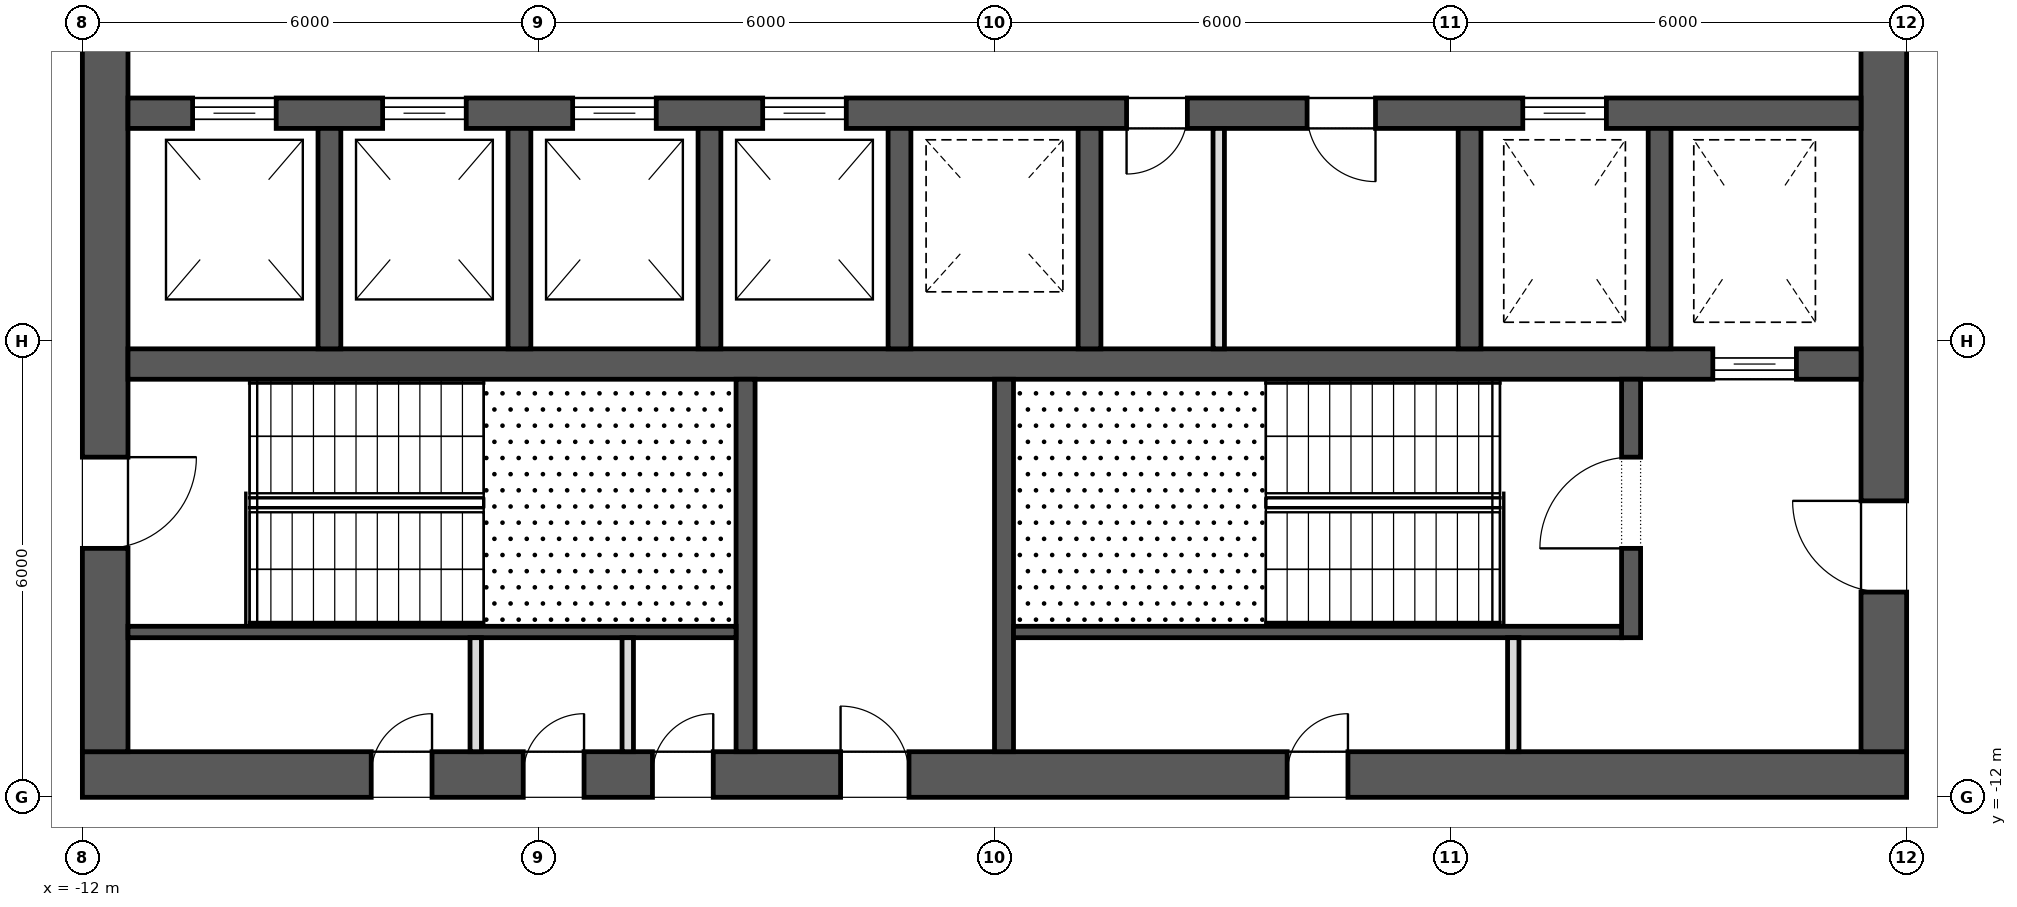
"""IFC4 building model, lengths in metres.
Left out: names, types, materials, properties, quantities, classifications, styles, units other than length and angle.
Written with IfcOpenShell. Run it as: python <this file> out.ifc"""

import sys

from ifc_helpers import new_model, si_unit, direction, frame, frame_2d, origin, place, context, subcontext, project, spatial, rectangle, extrude, element, fill, save


model = new_model("IFC4")
c1 = context("Model", 3, precision=1e-05, world=origin(), true_north=direction((0.0, 1.0)))
c2 = subcontext(c1, "Body", "Model", "MODEL_VIEW")
j1 = project(units=[si_unit("LENGTHUNIT", "METRE"), si_unit("PLANEANGLEUNIT", "RADIAN")], contexts=[c1])
p1 = place(None, origin())
s1 = spatial("IfcSite", under=j1, at=p1, CompositionType="ELEMENT")
p2 = place(p1, origin())
s2 = spatial("IfcBuilding", under=s1, at=p2, CompositionType="ELEMENT")
p3 = place(p2, frame((0.0, 0.0, 186.9)))
s3 = spatial("IfcBuildingStorey", under=s2, at=p3, CompositionType="ELEMENT", Elevation=186.9)
p4 = place(p3, frame((-12.0, -11.7, 0.0), z_axis=(0.0, 0.0, 1.0), x_axis=(1.0, 0.0, 0.0)))
e1 = element("IfcWall", 1, at=p4, inside=s3, PredefinedType="SHEAR", context=c2, shape_type="SweptSolid", body=[
    extrude(rectangle(XDim=24.0, YDim=0.6, at=frame_2d((12.0, 0.0))), origin(), (0.0, 0.0, 1.0), 4.0),
])
p5 = place(p4, frame((9.975, 0.0, 0.0)))
e2 = element("IfcOpeningElement", 2, at=p5, cuts=e1, PredefinedType="OPENING", context=c2, shape_type="SweptSolid", body=[
    extrude(rectangle(XDim=0.9, YDim=2.1, at=frame_2d((0.45, 1.05))), frame((0.0, 0.312, 0.0), z_axis=(0.0, -1.0, 0.0), x_axis=(1.0, 0.0, 0.0)), (0.0, 0.0, 1.0), 0.624),
])
p6 = place(p4, frame((3.8, 0.0, 0.0)))
e3 = element("IfcOpeningElement", 3, at=p6, cuts=e1, PredefinedType="OPENING", context=c2, shape_type="SweptSolid", body=[
    extrude(rectangle(XDim=0.8, YDim=2.1, at=frame_2d((0.4, 1.05))), frame((0.0, 0.312, 0.0), z_axis=(0.0, -1.0, 0.0), x_axis=(1.0, 0.0, 0.0)), (0.0, 0.0, 1.0), 0.624),
])
p7 = place(p4, frame((5.8, 0.0, 0.0)))
e4 = element("IfcOpeningElement", 4, at=p7, cuts=e1, PredefinedType="OPENING", context=c2, shape_type="SweptSolid", body=[
    extrude(rectangle(XDim=0.8, YDim=2.1, at=frame_2d((0.4, 1.05))), frame((0.0, 0.312, 0.0), z_axis=(0.0, -1.0, 0.0), x_axis=(1.0, 0.0, 0.0)), (0.0, 0.0, 1.0), 0.624),
])
p8 = place(p4, frame((7.5, 0.0, 0.0)))
e5 = element("IfcOpeningElement", 5, at=p8, cuts=e1, PredefinedType="OPENING", context=c2, shape_type="SweptSolid", body=[
    extrude(rectangle(XDim=0.8, YDim=2.1, at=frame_2d((0.4, 1.05))), frame((0.0, 0.312, 0.0), z_axis=(0.0, -1.0, 0.0), x_axis=(1.0, 0.0, 0.0)), (0.0, 0.0, 1.0), 0.624),
])
p9 = place(p4, frame((15.85, 0.0, 0.0)))
e6 = element("IfcOpeningElement", 6, at=p9, cuts=e1, PredefinedType="OPENING", context=c2, shape_type="SweptSolid", body=[
    extrude(rectangle(XDim=0.8, YDim=2.1, at=frame_2d((0.4, 1.05))), frame((0.0, 0.312, 0.0), z_axis=(0.0, -1.0, 0.0), x_axis=(1.0, 0.0, 0.0)), (0.0, 0.0, 1.0), 0.624),
])
p10 = place(p3, frame((11.7, -11.4, 0.0), z_axis=(0.0, 0.0, 1.0), x_axis=(0.0, 1.0, 0.0)))
e7 = element("IfcWall", 7, at=p10, inside=s3, PredefinedType="SHEAR", context=c2, shape_type="SweptSolid", body=[
    extrude(rectangle(XDim=22.8, YDim=0.6, at=frame_2d((11.4, 0.0))), origin(), (0.0, 0.0, 1.0), 4.0),
])
p11 = place(p10, frame((10.2, 0.0, 0.0)))
e8 = element("IfcOpeningElement", 8, at=p11, cuts=e7, PredefinedType="OPENING", context=c2, shape_type="SweptSolid", body=[
    extrude(rectangle(XDim=2.4, YDim=2.1, at=frame_2d((1.2, 1.05))), frame((0.0, 0.312, 0.0), z_axis=(0.0, -1.0, 0.0), x_axis=(1.0, 0.0, 0.0)), (0.0, 0.0, 1.0), 0.624),
])
p12 = place(p10, frame((19.5, 0.0, 0.0)))
e9 = element("IfcOpeningElement", 9, at=p12, cuts=e7, PredefinedType="OPENING", context=c2, shape_type="SweptSolid", body=[
    extrude(rectangle(XDim=1.2, YDim=2.1, at=frame_2d((0.6, 1.05))), frame((0.0, 0.312, 0.0), z_axis=(0.0, -1.0, 0.0), x_axis=(1.0, 0.0, 0.0)), (0.0, 0.0, 1.0), 0.624),
])
p13 = place(p10, frame((2.1, 0.0, 0.0)))
e10 = element("IfcOpeningElement", 10, at=p13, cuts=e7, PredefinedType="OPENING", context=c2, shape_type="SweptSolid", body=[
    extrude(rectangle(XDim=1.2, YDim=2.1, at=frame_2d((0.6, 1.05))), frame((0.0, 0.312, 0.0), z_axis=(0.0, -1.0, 0.0), x_axis=(1.0, 0.0, 0.0)), (0.0, 0.0, 1.0), 0.624),
])
p14 = place(p3, frame((-11.7, -11.4, 0.0), z_axis=(0.0, 0.0, 1.0), x_axis=(0.0, 1.0, 0.0)))
e11 = element("IfcWall", 11, at=p14, inside=s3, PredefinedType="SHEAR", context=c2, shape_type="SweptSolid", body=[
    extrude(rectangle(XDim=22.8, YDim=0.6, at=frame_2d((11.4, 0.0))), origin(), (0.0, 0.0, 1.0), 4.0),
])
p15 = place(p14, frame((10.2, 0.0, 0.0)))
e12 = element("IfcOpeningElement", 12, at=p15, cuts=e11, PredefinedType="OPENING", context=c2, shape_type="SweptSolid", body=[
    extrude(rectangle(XDim=2.4, YDim=2.1, at=frame_2d((1.2, 1.05))), frame((0.0, 0.312, 0.0), z_axis=(0.0, -1.0, 0.0), x_axis=(1.0, 0.0, 0.0)), (0.0, 0.0, 1.0), 0.624),
])
p16 = place(p14, frame((18.925, 0.0, 0.0)))
e13 = element("IfcOpeningElement", 13, at=p16, cuts=e11, PredefinedType="OPENING", context=c2, shape_type="SweptSolid", body=[
    extrude(rectangle(XDim=1.2, YDim=2.1, at=frame_2d((0.6, 1.05))), frame((0.0, 0.312, 0.0), z_axis=(0.0, -1.0, 0.0), x_axis=(1.0, 0.0, 0.0)), (0.0, 0.0, 1.0), 0.624),
])
p17 = place(p14, frame((2.675, 0.0, 0.0)))
e14 = element("IfcOpeningElement", 14, at=p17, cuts=e11, PredefinedType="OPENING", context=c2, shape_type="SweptSolid", body=[
    extrude(rectangle(XDim=1.2, YDim=2.1, at=frame_2d((0.6, 1.05))), frame((0.0, 0.312, 0.0), z_axis=(0.0, -1.0, 0.0), x_axis=(1.0, 0.0, 0.0)), (0.0, 0.0, 1.0), 0.624),
])
p18 = place(p3, frame((-11.4, -3.0, 0.0), z_axis=(0.0, 0.0, 1.0), x_axis=(1.0, 0.0, 0.0)))
e15 = element("IfcWall", 15, at=p18, inside=s3, PredefinedType="SHEAR", context=c2, shape_type="SweptSolid", body=[
    extrude(rectangle(XDim=22.8, YDim=0.4, at=frame_2d((11.4, 0.0))), origin(), (0.0, 0.0, 1.0), 4.0),
])
p19 = place(p18, frame((0.85, 0.0, 0.0)))
e16 = element("IfcOpeningElement", 16, at=p19, cuts=e15, PredefinedType="OPENING", context=c2, shape_type="SweptSolid", body=[
    extrude(rectangle(XDim=1.1, YDim=2.1, at=frame_2d((0.55, 1.05))), frame((0.0, 0.212, 0.0), z_axis=(0.0, -1.0, 0.0), x_axis=(1.0, 0.0, 0.0)), (0.0, 0.0, 1.0), 0.424),
])
p20 = place(p18, frame((3.35, 0.0, 0.0)))
e17 = element("IfcOpeningElement", 17, at=p20, cuts=e15, PredefinedType="OPENING", context=c2, shape_type="SweptSolid", body=[
    extrude(rectangle(XDim=1.1, YDim=2.1, at=frame_2d((0.55, 1.05))), frame((0.0, 0.212, 0.0), z_axis=(0.0, -1.0, 0.0), x_axis=(1.0, 0.0, 0.0)), (0.0, 0.0, 1.0), 0.424),
])
p21 = place(p18, frame((5.85, 0.0, 0.0)))
e18 = element("IfcOpeningElement", 18, at=p21, cuts=e15, PredefinedType="OPENING", context=c2, shape_type="SweptSolid", body=[
    extrude(rectangle(XDim=1.1, YDim=2.1, at=frame_2d((0.55, 1.05))), frame((0.0, 0.212, 0.0), z_axis=(0.0, -1.0, 0.0), x_axis=(1.0, 0.0, 0.0)), (0.0, 0.0, 1.0), 0.424),
])
p22 = place(p18, frame((8.35, 0.0, 0.0)))
e19 = element("IfcOpeningElement", 19, at=p22, cuts=e15, PredefinedType="OPENING", context=c2, shape_type="SweptSolid", body=[
    extrude(rectangle(XDim=1.1, YDim=2.1, at=frame_2d((0.55, 1.05))), frame((0.0, 0.212, 0.0), z_axis=(0.0, -1.0, 0.0), x_axis=(1.0, 0.0, 0.0)), (0.0, 0.0, 1.0), 0.424),
])
p23 = place(p18, frame((18.35, 0.0, 0.0)))
e20 = element("IfcOpeningElement", 20, at=p23, cuts=e15, PredefinedType="OPENING", context=c2, shape_type="SweptSolid", body=[
    extrude(rectangle(XDim=1.1, YDim=2.1, at=frame_2d((0.55, 1.05))), frame((0.0, 0.212, 0.0), z_axis=(0.0, -1.0, 0.0), x_axis=(1.0, 0.0, 0.0)), (0.0, 0.0, 1.0), 0.424),
])
p24 = place(p18, frame((13.137, 0.0, 0.0)))
e21 = element("IfcOpeningElement", 21, at=p24, cuts=e15, PredefinedType="OPENING", context=c2, shape_type="SweptSolid", body=[
    extrude(rectangle(XDim=0.8, YDim=2.1, at=frame_2d((0.4, 1.05))), frame((0.0, 0.212, 0.0), z_axis=(0.0, -1.0, 0.0), x_axis=(1.0, 0.0, 0.0)), (0.0, 0.0, 1.0), 0.424),
])
p25 = place(p18, frame((15.512, 0.0, 0.0)))
e22 = element("IfcOpeningElement", 22, at=p25, cuts=e15, PredefinedType="OPENING", context=c2, shape_type="SweptSolid", body=[
    extrude(rectangle(XDim=0.9, YDim=2.1, at=frame_2d((0.45, 1.05))), frame((0.0, 0.212, 0.0), z_axis=(0.0, -1.0, 0.0), x_axis=(1.0, 0.0, 0.0)), (0.0, 0.0, 1.0), 0.424),
])
p26 = place(p3, frame((-11.4, -6.3, 0.0), z_axis=(0.0, 0.0, 1.0), x_axis=(1.0, 0.0, 0.0)))
e23 = element("IfcWall", 23, at=p26, inside=s3, PredefinedType="SHEAR", context=c2, shape_type="SweptSolid", body=[
    extrude(rectangle(XDim=22.8, YDim=0.4, at=frame_2d((11.4, 0.0))), origin(), (0.0, 0.0, 1.0), 4.0),
])
p27 = place(p26, frame((20.85, 0.0, 0.0)))
e24 = element("IfcOpeningElement", 24, at=p27, cuts=e23, PredefinedType="OPENING", context=c2, shape_type="SweptSolid", body=[
    extrude(rectangle(XDim=1.1, YDim=2.1, at=frame_2d((0.55, 1.05))), frame((0.0, 0.212, 0.0), z_axis=(0.0, -1.0, 0.0), x_axis=(1.0, 0.0, 0.0)), (0.0, 0.0, 1.0), 0.424),
])
for number, where, z_axis, x_axis in (
    (25, (-8.75, -6.1, 0.0), (0.0, 0.0, 1.0), (0.0, 1.0, 0.0)),
    (26, (-6.25, -6.1, 0.0), (0.0, 0.0, 1.0), (0.0, 1.0, 0.0)),
    (27, (-3.75, -6.1, 0.0), (0.0, 0.0, 1.0), (0.0, 1.0, 0.0)),
    (28, (-1.25, -6.1, 0.0), (0.0, 0.0, 1.0), (0.0, 1.0, 0.0)),
    (29, (1.25, -6.1, 0.0), (0.0, 0.0, 1.0), (0.0, 1.0, 0.0)),
    (30, (6.25, -6.1, 0.0), (0.0, 0.0, 1.0), (0.0, 1.0, 0.0)),
    (31, (8.75, -6.1, 0.0), (0.0, 0.0, 1.0), (0.0, 1.0, 0.0)),
):
    element("IfcWall", number, at=place(p3, frame(where, z_axis=z_axis, x_axis=x_axis)), inside=s3, PredefinedType="SHEAR", context=c2, shape_type="SweptSolid", body=[
        extrude(rectangle(XDim=2.9, YDim=0.3, at=frame_2d((1.45, 0.0))), origin(), (0.0, 0.0, 1.0), 4.0),
    ])
for number, where, z_axis, x_axis in (
    (32, (-3.275, -11.4, 0.0), (0.0, 0.0, 1.0), (0.0, 1.0, 0.0)),
    (33, (0.125, -11.4, 0.0), (0.0, 0.0, 1.0), (0.0, 1.0, 0.0)),
):
    element("IfcWall", number, at=place(p3, frame(where, z_axis=z_axis, x_axis=x_axis)), inside=s3, PredefinedType="SHEAR", context=c2, shape_type="SweptSolid", body=[
        extrude(rectangle(XDim=4.9, YDim=0.25, at=frame_2d((2.45, 0.0))), origin(), (0.0, 0.0, 1.0), 3.7),
    ])
p28 = place(p3, frame((8.375, -9.9, 0.0), z_axis=(0.0, 0.0, 1.0), x_axis=(0.0, 1.0, 0.0)))
e34 = element("IfcWall", 34, at=p28, inside=s3, PredefinedType="SHEAR", context=c2, shape_type="SweptSolid", body=[
    extrude(rectangle(XDim=3.4, YDim=0.25, at=frame_2d((1.7, 0.0))), origin(), (0.0, 0.0, 1.0), 3.7),
])
p29 = place(p28, frame((1.175, 0.0, 0.0)))
e35 = element("IfcOpeningElement", 35, at=p29, cuts=e34, PredefinedType="OPENING", context=c2, shape_type="SweptSolid", body=[
    extrude(rectangle(XDim=1.2, YDim=2.1, at=frame_2d((0.6, 1.05))), frame((0.0, 0.137, 0.0), z_axis=(0.0, -1.0, 0.0), x_axis=(1.0, 0.0, 0.0)), (0.0, 0.0, 1.0), 0.274),
])
for number, where, z_axis, x_axis in (
    (36, (-11.4, -9.825, 0.0), (0.0, 0.0, 1.0), (1.0, 0.0, 0.0)),
    (37, (0.25, -9.825, 0.0), (0.0, 0.0, 1.0), (1.0, 0.0, 0.0)),
):
    element("IfcWall", number, at=place(p3, frame(where, z_axis=z_axis, x_axis=x_axis)), inside=s3, PredefinedType="SHEAR", context=c2, shape_type="SweptSolid", body=[
        extrude(rectangle(XDim=8.0, YDim=0.15, at=frame_2d((4.0, 0.0))), origin(), (0.0, 0.0, 1.0), 3.7),
    ])
for number, where, z_axis, x_axis in (
    (38, (-6.825, -11.4, 0.0), (0.0, 0.0, 1.0), (0.0, 1.0, 0.0)),
    (39, (-4.825, -11.4, 0.0), (0.0, 0.0, 1.0), (0.0, 1.0, 0.0)),
    (40, (6.825, -11.4, 0.0), (0.0, 0.0, 1.0), (0.0, 1.0, 0.0)),
):
    element("IfcWall", number, at=place(p3, frame(where, z_axis=z_axis, x_axis=x_axis)), inside=s3, PredefinedType="PARTITIONING", context=c2, shape_type="SweptSolid", body=[
        extrude(rectangle(XDim=1.5, YDim=0.15, at=frame_2d((0.75, 0.0))), origin(), (0.0, 0.0, 1.0), 3.7),
    ])
p30 = place(p3, frame((2.95, -6.1, 0.0), z_axis=(0.0, 0.0, 1.0), x_axis=(0.0, 1.0, 0.0)))
e41 = element("IfcWall", 41, at=p30, inside=s3, PredefinedType="PARTITIONING", context=c2, shape_type="SweptSolid", body=[
    extrude(rectangle(XDim=2.9, YDim=0.15, at=frame_2d((1.45, 0.0))), origin(), (0.0, 0.0, 1.0), 3.7),
])
p31 = place(p27, origin())
e42 = element("IfcDoor", 42, at=p31, inside=s3, OperationType="SLIDING_TO_LEFT", PredefinedType="DOOR", context=c2, shape_type="SweptSolid", body=[
    extrude(rectangle(XDim=1.1, YDim=2.1, at=frame_2d((0.55, 1.05))), frame((0.0, 0.025, 0.0), z_axis=(0.0, -1.0, 0.0), x_axis=(1.0, 0.0, 0.0)), (0.0, 0.0, 1.0), 0.05),
])
fill(e24, e42)
p32 = place(p19, origin())
e43 = element("IfcDoor", 43, at=p32, inside=s3, OperationType="SLIDING_TO_LEFT", PredefinedType="DOOR", context=c2, shape_type="SweptSolid", body=[
    extrude(rectangle(XDim=1.1, YDim=2.1, at=frame_2d((0.55, 1.05))), frame((0.0, 0.025, 0.0), z_axis=(0.0, -1.0, 0.0), x_axis=(1.0, 0.0, 0.0)), (0.0, 0.0, 1.0), 0.05),
])
fill(e16, e43)
p33 = place(p20, origin())
e44 = element("IfcDoor", 44, at=p33, inside=s3, OperationType="SLIDING_TO_LEFT", PredefinedType="DOOR", context=c2, shape_type="SweptSolid", body=[
    extrude(rectangle(XDim=1.1, YDim=2.1, at=frame_2d((0.55, 1.05))), frame((0.0, 0.025, 0.0), z_axis=(0.0, -1.0, 0.0), x_axis=(1.0, 0.0, 0.0)), (0.0, 0.0, 1.0), 0.05),
])
fill(e17, e44)
p34 = place(p21, origin())
e45 = element("IfcDoor", 45, at=p34, inside=s3, OperationType="SLIDING_TO_LEFT", PredefinedType="DOOR", context=c2, shape_type="SweptSolid", body=[
    extrude(rectangle(XDim=1.1, YDim=2.1, at=frame_2d((0.55, 1.05))), frame((0.0, 0.025, 0.0), z_axis=(0.0, -1.0, 0.0), x_axis=(1.0, 0.0, 0.0)), (0.0, 0.0, 1.0), 0.05),
])
fill(e18, e45)
p35 = place(p22, origin())
e46 = element("IfcDoor", 46, at=p35, inside=s3, OperationType="SLIDING_TO_LEFT", PredefinedType="DOOR", context=c2, shape_type="SweptSolid", body=[
    extrude(rectangle(XDim=1.1, YDim=2.1, at=frame_2d((0.55, 1.05))), frame((0.0, 0.025, 0.0), z_axis=(0.0, -1.0, 0.0), x_axis=(1.0, 0.0, 0.0)), (0.0, 0.0, 1.0), 0.05),
])
fill(e19, e46)
p36 = place(p23, origin())
e47 = element("IfcDoor", 47, at=p36, inside=s3, OperationType="SLIDING_TO_LEFT", PredefinedType="DOOR", context=c2, shape_type="SweptSolid", body=[
    extrude(rectangle(XDim=1.1, YDim=2.1, at=frame_2d((0.55, 1.05))), frame((0.0, 0.025, 0.0), z_axis=(0.0, -1.0, 0.0), x_axis=(1.0, 0.0, 0.0)), (0.0, 0.0, 1.0), 0.05),
])
fill(e20, e47)
p37 = place(p17, frame((1.2, 0.0, 0.0), z_axis=(0.0, 0.0, 1.0), x_axis=(-1.0, 0.0, 0.0)))
e48 = element("IfcDoor", 48, at=p37, inside=s3, OperationType="SINGLE_SWING_RIGHT", PredefinedType="DOOR", context=c2, shape_type="SweptSolid", body=[
    extrude(rectangle(XDim=1.2, YDim=2.1, at=frame_2d((0.6, 1.05))), frame((0.0, 0.025, 0.0), z_axis=(0.0, -1.0, 0.0), x_axis=(1.0, 0.0, 0.0)), (0.0, 0.0, 1.0), 0.05),
])
fill(e14, e48)
p38 = place(p29, origin())
e49 = element("IfcDoor", 49, at=p38, inside=s3, OperationType="SINGLE_SWING_RIGHT", PredefinedType="DOOR", context=c2, shape_type="SweptSolid", body=[
    extrude(rectangle(XDim=1.2, YDim=2.1, at=frame_2d((0.6, 1.05))), frame((0.0, 0.025, 0.0), z_axis=(0.0, -1.0, 0.0), x_axis=(1.0, 0.0, 0.0)), (0.0, 0.0, 1.0), 0.05),
])
fill(e35, e49)
p39 = place(p13, origin())
e50 = element("IfcDoor", 50, at=p39, inside=s3, OperationType="SINGLE_SWING_LEFT", PredefinedType="DOOR", context=c2, shape_type="SweptSolid", body=[
    extrude(rectangle(XDim=1.2, YDim=2.1, at=frame_2d((0.6, 1.05))), frame((0.0, 0.025, 0.0), z_axis=(0.0, -1.0, 0.0), x_axis=(1.0, 0.0, 0.0)), (0.0, 0.0, 1.0), 0.05),
])
fill(e10, e50)
p40 = place(p5, origin())
e51 = element("IfcDoor", 51, at=p40, inside=s3, OperationType="SINGLE_SWING_RIGHT", PredefinedType="DOOR", context=c2, shape_type="SweptSolid", body=[
    extrude(rectangle(XDim=0.9, YDim=2.1, at=frame_2d((0.45, 1.05))), frame((0.0, 0.025, 0.0), z_axis=(0.0, -1.0, 0.0), x_axis=(1.0, 0.0, 0.0)), (0.0, 0.0, 1.0), 0.05),
])
fill(e2, e51)
p41 = place(p6, origin())
e52 = element("IfcDoor", 52, at=p41, inside=s3, OperationType="SINGLE_SWING_LEFT", PredefinedType="DOOR", context=c2, shape_type="SweptSolid", body=[
    extrude(rectangle(XDim=0.8, YDim=2.1, at=frame_2d((0.4, 1.05))), frame((0.0, 0.025, 0.0), z_axis=(0.0, -1.0, 0.0), x_axis=(1.0, 0.0, 0.0)), (0.0, 0.0, 1.0), 0.05),
])
fill(e3, e52)
p42 = place(p7, origin())
e53 = element("IfcDoor", 53, at=p42, inside=s3, OperationType="SINGLE_SWING_LEFT", PredefinedType="DOOR", context=c2, shape_type="SweptSolid", body=[
    extrude(rectangle(XDim=0.8, YDim=2.1, at=frame_2d((0.4, 1.05))), frame((0.0, 0.025, 0.0), z_axis=(0.0, -1.0, 0.0), x_axis=(1.0, 0.0, 0.0)), (0.0, 0.0, 1.0), 0.05),
])
fill(e4, e53)
p43 = place(p8, origin())
e54 = element("IfcDoor", 54, at=p43, inside=s3, OperationType="SINGLE_SWING_LEFT", PredefinedType="DOOR", context=c2, shape_type="SweptSolid", body=[
    extrude(rectangle(XDim=0.8, YDim=2.1, at=frame_2d((0.4, 1.05))), frame((0.0, 0.025, 0.0), z_axis=(0.0, -1.0, 0.0), x_axis=(1.0, 0.0, 0.0)), (0.0, 0.0, 1.0), 0.05),
])
fill(e5, e54)
p44 = place(p9, origin())
e55 = element("IfcDoor", 55, at=p44, inside=s3, OperationType="SINGLE_SWING_LEFT", PredefinedType="DOOR", context=c2, shape_type="SweptSolid", body=[
    extrude(rectangle(XDim=0.8, YDim=2.1, at=frame_2d((0.4, 1.05))), frame((0.0, 0.025, 0.0), z_axis=(0.0, -1.0, 0.0), x_axis=(1.0, 0.0, 0.0)), (0.0, 0.0, 1.0), 0.05),
])
fill(e6, e55)
p45 = place(p24, frame((0.8, 0.0, 0.0), z_axis=(0.0, 0.0, 1.0), x_axis=(-1.0, 0.0, 0.0)))
e56 = element("IfcDoor", 56, at=p45, inside=s3, OperationType="SINGLE_SWING_LEFT", PredefinedType="DOOR", context=c2, shape_type="SweptSolid", body=[
    extrude(rectangle(XDim=0.8, YDim=2.1, at=frame_2d((0.4, 1.05))), frame((0.0, 0.025, 0.0), z_axis=(0.0, -1.0, 0.0), x_axis=(1.0, 0.0, 0.0)), (0.0, 0.0, 1.0), 0.05),
])
fill(e21, e56)
p46 = place(p25, frame((0.9, 0.0, 0.0), z_axis=(0.0, 0.0, 1.0), x_axis=(-1.0, 0.0, 0.0)))
e57 = element("IfcDoor", 57, at=p46, inside=s3, OperationType="SINGLE_SWING_RIGHT", PredefinedType="DOOR", context=c2, shape_type="SweptSolid", body=[
    extrude(rectangle(XDim=0.9, YDim=2.1, at=frame_2d((0.45, 1.05))), frame((0.0, 0.025, 0.0), z_axis=(0.0, -1.0, 0.0), x_axis=(1.0, 0.0, 0.0)), (0.0, 0.0, 1.0), 0.05),
])
fill(e22, e57)
save(model, sys.argv[1])
